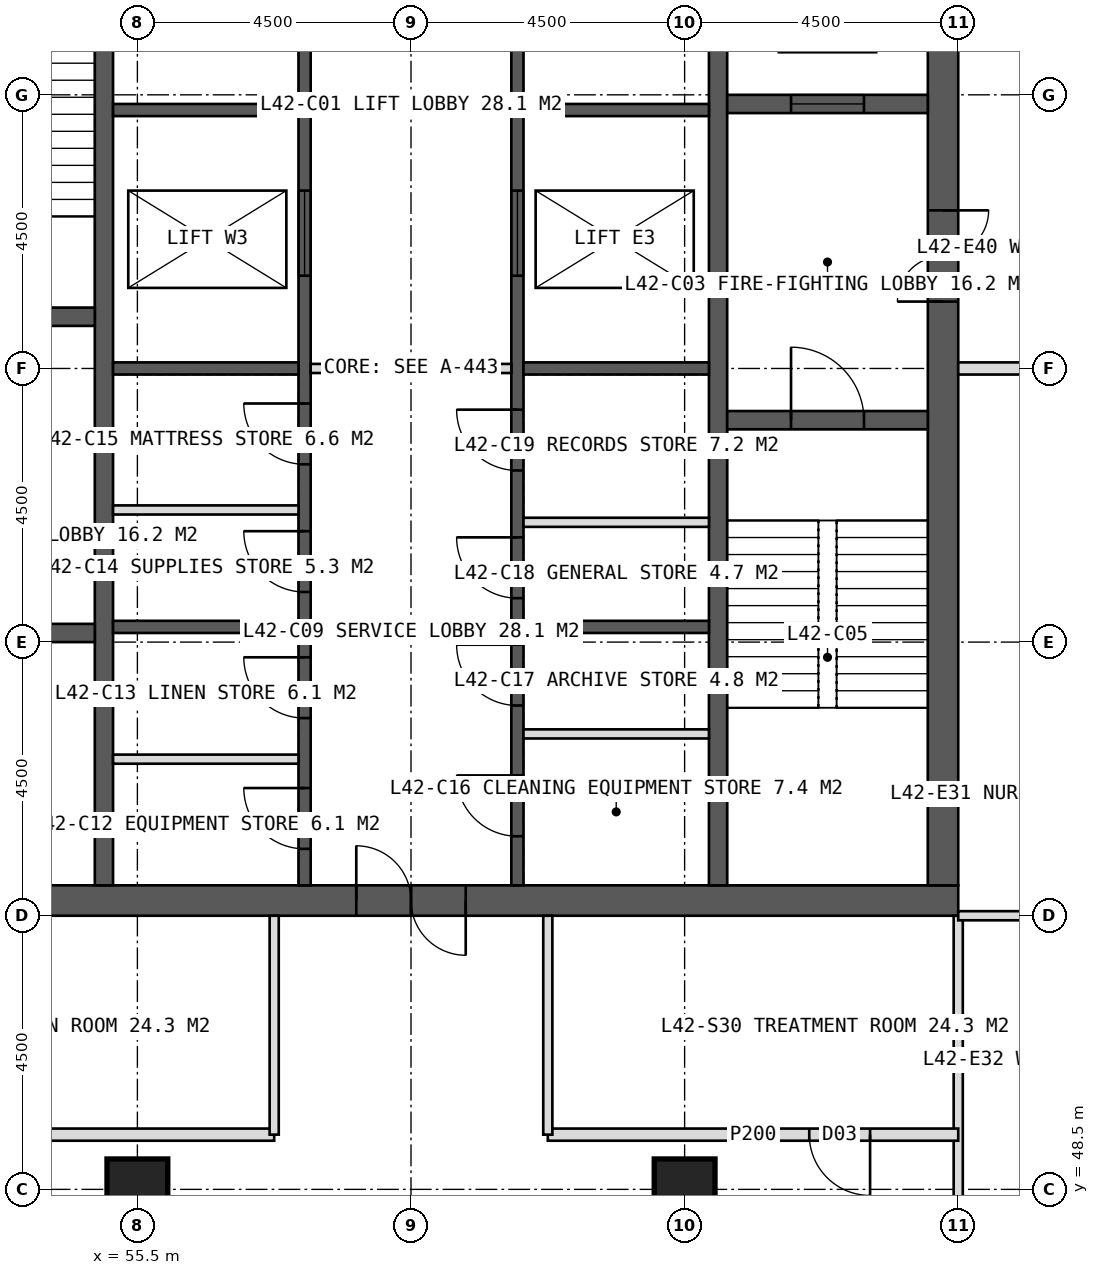
"""IFC4 building model, lengths in metres.
Left out: names, types, materials, properties, quantities, classifications, styles, units other than length and angle.
Written with IfcOpenShell. Run it as: python <this file> out.ifc"""

import sys

from ifc_helpers import new_model, si_unit, direction, frame, frame_2d, origin, origin_2d, place, context, subcontext, project, spatial, rectangle, hollow_rectangle, extrude, element, fill, save


model = new_model("IFC4")
c1 = context("Model", 3, precision=1e-05, world=origin(), true_north=direction((0.0, 1.0)))
c2 = subcontext(c1, "Body", "Model", "MODEL_VIEW")
j1 = project(units=[si_unit("LENGTHUNIT", "METRE"), si_unit("PLANEANGLEUNIT", "RADIAN")], contexts=[c1])
p1 = place(None, origin())
s1 = spatial("IfcSite", under=j1, at=p1, CompositionType="ELEMENT")
p2 = place(p1, origin())
s2 = spatial("IfcBuilding", under=s1, at=p2, CompositionType="ELEMENT")
p3 = place(p2, frame((0.0, 0.0, 177.0)))
s3 = spatial("IfcBuildingStorey", under=s2, at=p3, CompositionType="ELEMENT", Elevation=177.0)
p4 = place(p3, frame((51.0, 53.25, 0.0), z_axis=(0.0, 0.0, 1.0), x_axis=(1.0, 0.0, 0.0)))
e1 = element("IfcWall", 1, at=p4, inside=s3, PredefinedType="SHEAR", context=c2, shape_type="SweptSolid", body=[
    extrude(rectangle(XDim=18.0, YDim=0.5, at=frame_2d((9.0, 0.0))), origin(), (0.0, 0.0, 1.0), 4.0),
])
p5 = place(p4, frame((8.1, 0.0, 0.0)))
e2 = element("IfcOpeningElement", 2, at=p5, cuts=e1, PredefinedType="OPENING", context=c2, shape_type="SweptSolid", body=[
    extrude(rectangle(XDim=1.8, YDim=2.2, at=frame_2d((0.9, 1.1))), frame((0.0, 0.26, 0.0), z_axis=(0.0, -1.0, 0.0), x_axis=(1.0, 0.0, 0.0)), (0.0, 0.0, 1.0), 0.52),
])
p6 = place(p3, frame((68.75, 53.5, 0.0), z_axis=(0.0, 0.0, 1.0), x_axis=(0.0, 1.0, 0.0)))
e3 = element("IfcWall", 3, at=p6, inside=s3, PredefinedType="SHEAR", context=c2, shape_type="SweptSolid", body=[
    extrude(rectangle(XDim=17.0, YDim=0.5, at=frame_2d((8.5, 0.0))), origin(), (0.0, 0.0, 1.0), 4.0),
])
p7 = place(p6, frame((9.6, 0.0, 0.0)))
e4 = element("IfcOpeningElement", 4, at=p7, cuts=e3, PredefinedType="OPENING", context=c2, shape_type="SweptSolid", body=[
    extrude(rectangle(XDim=1.5, YDim=2.2, at=frame_2d((0.75, 1.1))), frame((0.0, 0.26, 0.0), z_axis=(0.0, -1.0, 0.0), x_axis=(1.0, 0.0, 0.0)), (0.0, 0.0, 1.0), 0.52),
])
for number, where, z_axis, x_axis in (
    (5, (54.95, 53.5, 0.0), (0.0, 0.0, 1.0), (0.0, 1.0, 0.0)),
    (6, (65.05, 53.5, 0.0), (0.0, 0.0, 1.0), (0.0, 1.0, 0.0)),
):
    element("IfcWall", number, at=place(p3, frame(where, z_axis=z_axis, x_axis=x_axis)), inside=s3, PredefinedType="SHEAR", context=c2, shape_type="SweptSolid", body=[
        extrude(rectangle(XDim=17.0, YDim=0.3, at=frame_2d((8.5, 0.0))), origin(), (0.0, 0.0, 1.0), 4.0),
    ])
p8 = place(p3, frame((58.25, 53.5, 0.0), z_axis=(0.0, 0.0, 1.0), x_axis=(0.0, 1.0, 0.0)))
e7 = element("IfcWall", 7, at=p8, inside=s3, PredefinedType="SHEAR", context=c2, shape_type="SweptSolid", body=[
    extrude(rectangle(XDim=17.0, YDim=0.2, at=frame_2d((8.5, 0.0))), origin(), (0.0, 0.0, 1.0), 4.0),
])
p9 = place(p8, frame((0.6, 0.0, 0.0)))
e8 = element("IfcOpeningElement", 8, at=p9, cuts=e7, PredefinedType="OPENING", context=c2, shape_type="SweptSolid", body=[
    extrude(rectangle(XDim=1.0, YDim=2.1, at=frame_2d((0.5, 1.05))), frame((0.0, 0.11, 0.0), z_axis=(0.0, -1.0, 0.0), x_axis=(1.0, 0.0, 0.0)), (0.0, 0.0, 1.0), 0.22),
])
p10 = place(p8, frame((2.75, 0.0, 0.0)))
e9 = element("IfcOpeningElement", 9, at=p10, cuts=e7, PredefinedType="OPENING", context=c2, shape_type="SweptSolid", body=[
    extrude(rectangle(XDim=1.0, YDim=2.1, at=frame_2d((0.5, 1.05))), frame((0.0, 0.11, 0.0), z_axis=(0.0, -1.0, 0.0), x_axis=(1.0, 0.0, 0.0)), (0.0, 0.0, 1.0), 0.22),
])
p11 = place(p8, frame((4.824, 0.0, 0.0)))
e10 = element("IfcOpeningElement", 10, at=p11, cuts=e7, PredefinedType="OPENING", context=c2, shape_type="SweptSolid", body=[
    extrude(rectangle(XDim=1.0, YDim=2.1, at=frame_2d((0.5, 1.05))), frame((0.0, 0.11, 0.0), z_axis=(0.0, -1.0, 0.0), x_axis=(1.0, 0.0, 0.0)), (0.0, 0.0, 1.0), 0.22),
])
p12 = place(p8, frame((6.924, 0.0, 0.0)))
e11 = element("IfcOpeningElement", 11, at=p12, cuts=e7, PredefinedType="OPENING", context=c2, shape_type="SweptSolid", body=[
    extrude(rectangle(XDim=1.0, YDim=2.1, at=frame_2d((0.5, 1.05))), frame((0.0, 0.11, 0.0), z_axis=(0.0, -1.0, 0.0), x_axis=(1.0, 0.0, 0.0)), (0.0, 0.0, 1.0), 0.22),
])
p13 = place(p8, frame((10.025, 0.0, 0.0)))
e12 = element("IfcOpeningElement", 12, at=p13, cuts=e7, PredefinedType="OPENING", context=c2, shape_type="SweptSolid", body=[
    extrude(rectangle(XDim=1.4, YDim=2.2, at=frame_2d((0.7, 1.1))), frame((0.0, 0.11, 0.0), z_axis=(0.0, -1.0, 0.0), x_axis=(1.0, 0.0, 0.0)), (0.0, 0.0, 1.0), 0.22),
])
p14 = place(p8, frame((14.325, 0.0, 0.0)))
e13 = element("IfcOpeningElement", 13, at=p14, cuts=e7, PredefinedType="OPENING", context=c2, shape_type="SweptSolid", body=[
    extrude(rectangle(XDim=1.4, YDim=2.2, at=frame_2d((0.7, 1.1))), frame((0.0, 0.11, 0.0), z_axis=(0.0, -1.0, 0.0), x_axis=(1.0, 0.0, 0.0)), (0.0, 0.0, 1.0), 0.22),
])
p15 = place(p3, frame((61.75, 53.5, 0.0), z_axis=(0.0, 0.0, 1.0), x_axis=(0.0, 1.0, 0.0)))
e14 = element("IfcWall", 14, at=p15, inside=s3, PredefinedType="SHEAR", context=c2, shape_type="SweptSolid", body=[
    extrude(rectangle(XDim=17.0, YDim=0.2, at=frame_2d((8.5, 0.0))), origin(), (0.0, 0.0, 1.0), 4.0),
])
p16 = place(p15, frame((0.808, 0.0, 0.0)))
e15 = element("IfcOpeningElement", 15, at=p16, cuts=e14, PredefinedType="OPENING", context=c2, shape_type="SweptSolid", body=[
    extrude(rectangle(XDim=1.0, YDim=2.1, at=frame_2d((0.5, 1.05))), frame((0.0, 0.11, 0.0), z_axis=(0.0, -1.0, 0.0), x_axis=(1.0, 0.0, 0.0)), (0.0, 0.0, 1.0), 0.22),
])
p17 = place(p15, frame((2.958, 0.0, 0.0)))
e16 = element("IfcOpeningElement", 16, at=p17, cuts=e14, PredefinedType="OPENING", context=c2, shape_type="SweptSolid", body=[
    extrude(rectangle(XDim=1.0, YDim=2.1, at=frame_2d((0.5, 1.05))), frame((0.0, 0.11, 0.0), z_axis=(0.0, -1.0, 0.0), x_axis=(1.0, 0.0, 0.0)), (0.0, 0.0, 1.0), 0.22),
])
p18 = place(p15, frame((4.722, 0.0, 0.0)))
e17 = element("IfcOpeningElement", 17, at=p18, cuts=e14, PredefinedType="OPENING", context=c2, shape_type="SweptSolid", body=[
    extrude(rectangle(XDim=1.0, YDim=2.1, at=frame_2d((0.5, 1.05))), frame((0.0, 0.11, 0.0), z_axis=(0.0, -1.0, 0.0), x_axis=(1.0, 0.0, 0.0)), (0.0, 0.0, 1.0), 0.22),
])
p19 = place(p15, frame((6.823, 0.0, 0.0)))
e18 = element("IfcOpeningElement", 18, at=p19, cuts=e14, PredefinedType="OPENING", context=c2, shape_type="SweptSolid", body=[
    extrude(rectangle(XDim=1.0, YDim=2.1, at=frame_2d((0.5, 1.05))), frame((0.0, 0.11, 0.0), z_axis=(0.0, -1.0, 0.0), x_axis=(1.0, 0.0, 0.0)), (0.0, 0.0, 1.0), 0.22),
])
p20 = place(p15, frame((10.025, 0.0, 0.0)))
e19 = element("IfcOpeningElement", 19, at=p20, cuts=e14, PredefinedType="OPENING", context=c2, shape_type="SweptSolid", body=[
    extrude(rectangle(XDim=1.4, YDim=2.2, at=frame_2d((0.7, 1.1))), frame((0.0, 0.11, 0.0), z_axis=(0.0, -1.0, 0.0), x_axis=(1.0, 0.0, 0.0)), (0.0, 0.0, 1.0), 0.22),
])
p21 = place(p15, frame((14.325, 0.0, 0.0)))
e20 = element("IfcOpeningElement", 20, at=p21, cuts=e14, PredefinedType="OPENING", context=c2, shape_type="SweptSolid", body=[
    extrude(rectangle(XDim=1.4, YDim=2.2, at=frame_2d((0.7, 1.1))), frame((0.0, 0.11, 0.0), z_axis=(0.0, -1.0, 0.0), x_axis=(1.0, 0.0, 0.0)), (0.0, 0.0, 1.0), 0.22),
])
for number, where, z_axis, x_axis in (
    (21, (55.1, 57.75, 0.0), (0.0, 0.0, 1.0), (1.0, 0.0, 0.0)),
    (22, (61.85, 57.75, 0.0), (0.0, 0.0, 1.0), (1.0, 0.0, 0.0)),
    (23, (55.1, 62.0, 0.0), (0.0, 0.0, 1.0), (1.0, 0.0, 0.0)),
    (24, (61.85, 62.0, 0.0), (0.0, 0.0, 1.0), (1.0, 0.0, 0.0)),
    (25, (55.1, 66.25, 0.0), (0.0, 0.0, 1.0), (1.0, 0.0, 0.0)),
    (26, (61.85, 66.25, 0.0), (0.0, 0.0, 1.0), (1.0, 0.0, 0.0)),
):
    element("IfcWall", number, at=place(p3, frame(where, z_axis=z_axis, x_axis=x_axis)), inside=s3, PredefinedType="SHEAR", context=c2, shape_type="SweptSolid", body=[
        extrude(rectangle(XDim=3.05, YDim=0.2, at=frame_2d((1.525, 0.0))), origin(), (0.0, 0.0, 1.0), 4.0),
    ])
p22 = place(p3, frame((51.5, 62.85, 0.0), z_axis=(0.0, 0.0, 1.0), x_axis=(1.0, 0.0, 0.0)))
e27 = element("IfcWall", 27, at=p22, inside=s3, PredefinedType="SHEAR", context=c2, shape_type="SweptSolid", body=[
    extrude(rectangle(XDim=3.3, YDim=0.3, at=frame_2d((1.65, 0.0))), origin(), (0.0, 0.0, 1.0), 4.0),
])
p23 = place(p22, frame((1.15, 0.0, 0.0)))
e28 = element("IfcOpeningElement", 28, at=p23, cuts=e27, PredefinedType="OPENING", context=c2, shape_type="SweptSolid", body=[
    extrude(rectangle(XDim=1.2, YDim=2.1, at=frame_2d((0.6, 1.05))), frame((0.0, 0.16, 0.0), z_axis=(0.0, -1.0, 0.0), x_axis=(1.0, 0.0, 0.0)), (0.0, 0.0, 1.0), 0.32),
])
p24 = place(p3, frame((51.5, 57.65, 0.0), z_axis=(0.0, 0.0, 1.0), x_axis=(1.0, 0.0, 0.0)))
e29 = element("IfcWall", 29, at=p24, inside=s3, PredefinedType="SHEAR", context=c2, shape_type="SweptSolid", body=[
    extrude(rectangle(XDim=3.3, YDim=0.3, at=frame_2d((1.65, 0.0))), origin(), (0.0, 0.0, 1.0), 4.0),
])
p25 = place(p24, frame((1.15, 0.0, 0.0)))
e30 = element("IfcOpeningElement", 30, at=p25, cuts=e29, PredefinedType="OPENING", context=c2, shape_type="SweptSolid", body=[
    extrude(rectangle(XDim=1.2, YDim=2.2, at=frame_2d((0.6, 1.1))), frame((0.0, 0.16, 0.0), z_axis=(0.0, -1.0, 0.0), x_axis=(1.0, 0.0, 0.0)), (0.0, 0.0, 1.0), 0.32),
])
p26 = place(p3, frame((65.2, 61.15, 0.0), z_axis=(0.0, 0.0, 1.0), x_axis=(1.0, 0.0, 0.0)))
e31 = element("IfcWall", 31, at=p26, inside=s3, PredefinedType="SHEAR", context=c2, shape_type="SweptSolid", body=[
    extrude(rectangle(XDim=3.3, YDim=0.3, at=frame_2d((1.65, 0.0))), origin(), (0.0, 0.0, 1.0), 4.0),
])
p27 = place(p26, frame((1.05, 0.0, 0.0)))
e32 = element("IfcOpeningElement", 32, at=p27, cuts=e31, PredefinedType="OPENING", context=c2, shape_type="SweptSolid", body=[
    extrude(rectangle(XDim=1.2, YDim=2.1, at=frame_2d((0.6, 1.05))), frame((0.0, 0.16, 0.0), z_axis=(0.0, -1.0, 0.0), x_axis=(1.0, 0.0, 0.0)), (0.0, 0.0, 1.0), 0.32),
])
p28 = place(p3, frame((65.2, 66.35, 0.0), z_axis=(0.0, 0.0, 1.0), x_axis=(1.0, 0.0, 0.0)))
e33 = element("IfcWall", 33, at=p28, inside=s3, PredefinedType="SHEAR", context=c2, shape_type="SweptSolid", body=[
    extrude(rectangle(XDim=3.3, YDim=0.3, at=frame_2d((1.65, 0.0))), origin(), (0.0, 0.0, 1.0), 4.0),
])
p29 = place(p28, frame((1.05, 0.0, 0.0)))
e34 = element("IfcOpeningElement", 34, at=p29, cuts=e33, PredefinedType="OPENING", context=c2, shape_type="SweptSolid", body=[
    extrude(rectangle(XDim=1.2, YDim=2.2, at=frame_2d((0.6, 1.1))), frame((0.0, 0.16, 0.0), z_axis=(0.0, -1.0, 0.0), x_axis=(1.0, 0.0, 0.0)), (0.0, 0.0, 1.0), 0.32),
])
for number, where, z_axis, x_axis in (
    (35, (55.5, 48.5, 0.0), (0.0, 0.0, 1.0), (1.0, 0.0, 0.0)),
    (36, (64.5, 48.5, 0.0), (0.0, 0.0, 1.0), (1.0, 0.0, 0.0)),
):
    element("IfcColumn", number, at=place(p3, frame(where, z_axis=z_axis, x_axis=x_axis)), inside=s3, PredefinedType="COLUMN", context=c2, shape_type="SweptSolid", body=[
        extrude(hollow_rectangle(XDim=1.0, YDim=1.0, WallThickness=0.1, at=origin_2d()), origin(), (0.0, 0.0, 1.0), 4.0),
    ])
p30 = place(p3, frame((69.0, 53.0, 0.0), z_axis=(0.0, 0.0, 1.0), x_axis=(0.0, -1.0, 0.0)))
e37 = element("IfcWall", 37, at=p30, inside=s3, PredefinedType="PARTITIONING", context=c2, shape_type="SweptSolid", body=[
    extrude(rectangle(XDim=5.1, YDim=0.15, at=frame_2d((2.55, 0.0))), origin(), (0.0, 0.0, 1.0), 3.75),
])
p31 = place(p3, frame((69.0, 49.4, 0.0), z_axis=(0.0, 0.0, 1.0), x_axis=(-1.0, 0.0, 0.0)))
e38 = element("IfcWall", 38, at=p31, inside=s3, PredefinedType="PARTITIONING", context=c2, shape_type="SweptSolid", body=[
    extrude(rectangle(XDim=6.75, YDim=0.2, at=frame_2d((3.375, 0.0))), origin(), (0.0, 0.0, 1.0), 3.75),
])
p32 = place(p31, frame((1.45, 0.0, 0.0)))
e39 = element("IfcOpeningElement", 39, at=p32, cuts=e38, PredefinedType="OPENING", context=c2, shape_type="SweptSolid", body=[
    extrude(rectangle(XDim=1.0, YDim=2.1, at=frame_2d((0.5, 1.05))), frame((0.0, 0.11, 0.0), z_axis=(0.0, -1.0, 0.0), x_axis=(1.0, 0.0, 0.0)), (0.0, 0.0, 1.0), 0.22),
])
p33 = place(p3, frame((57.75, 49.4, 0.0), z_axis=(0.0, 0.0, 1.0), x_axis=(-1.0, 0.0, 0.0)))
e40 = element("IfcWall", 40, at=p33, inside=s3, PredefinedType="PARTITIONING", context=c2, shape_type="SweptSolid", body=[
    extrude(rectangle(XDim=11.85, YDim=0.2, at=frame_2d((5.925, 0.0))), origin(), (0.0, 0.0, 1.0), 3.75),
])
p34 = place(p33, frame((4.3, 0.0, 0.0)))
e41 = element("IfcOpeningElement", 41, at=p34, cuts=e40, PredefinedType="OPENING", context=c2, shape_type="SweptSolid", body=[
    extrude(rectangle(XDim=1.0, YDim=2.1, at=frame_2d((0.5, 1.05))), frame((0.0, 0.11, 0.0), z_axis=(0.0, -1.0, 0.0), x_axis=(1.0, 0.0, 0.0)), (0.0, 0.0, 1.0), 0.22),
])
p35 = place(p33, frame((8.8, 0.0, 0.0)))
e42 = element("IfcOpeningElement", 42, at=p35, cuts=e40, PredefinedType="OPENING", context=c2, shape_type="SweptSolid", body=[
    extrude(rectangle(XDim=1.0, YDim=2.1, at=frame_2d((0.5, 1.05))), frame((0.0, 0.11, 0.0), z_axis=(0.0, -1.0, 0.0), x_axis=(1.0, 0.0, 0.0)), (0.0, 0.0, 1.0), 0.22),
])
for number, where, z_axis, x_axis in (
    (43, (62.25, 53.0, 0.0), (0.0, 0.0, 1.0), (0.0, -1.0, 0.0)),
    (44, (57.75, 53.0, 0.0), (0.0, 0.0, 1.0), (0.0, -1.0, 0.0)),
):
    element("IfcWall", number, at=place(p3, frame(where, z_axis=z_axis, x_axis=x_axis)), inside=s3, PredefinedType="PARTITIONING", context=c2, shape_type="SweptSolid", body=[
        extrude(rectangle(XDim=3.6, YDim=0.15, at=frame_2d((1.8, 0.0))), origin(), (0.0, 0.0, 1.0), 3.75),
    ])
p36 = place(p3, frame((69.0, 62.0, 0.0), z_axis=(0.0, 0.0, 1.0), x_axis=(1.0, 0.0, 0.0)))
e45 = element("IfcWall", 45, at=p36, inside=s3, PredefinedType="SOLIDWALL", context=c2, shape_type="SweptSolid", body=[
    extrude(rectangle(XDim=5.1, YDim=0.2, at=frame_2d((2.55, 0.0))), origin(), (0.0, 0.0, 1.0), 2.95),
])
p37 = place(p3, frame((69.0, 53.0, 0.0), z_axis=(0.0, 0.0, 1.0), x_axis=(1.0, 0.0, 0.0)))
e46 = element("IfcWall", 46, at=p37, inside=s3, PredefinedType="PARTITIONING", context=c2, shape_type="SweptSolid", body=[
    extrude(rectangle(XDim=5.1, YDim=0.15, at=frame_2d((2.55, 0.0))), origin(), (0.0, 0.0, 1.0), 3.75),
])
for number, where, z_axis, x_axis in (
    (47, (55.1, 55.575, 0.0), (0.0, 0.0, 1.0), (1.0, 0.0, 0.0)),
    (48, (61.85, 55.99, 0.0), (0.0, 0.0, 1.0), (1.0, 0.0, 0.0)),
    (49, (55.1, 59.673, 0.0), (0.0, 0.0, 1.0), (1.0, 0.0, 0.0)),
    (50, (61.85, 59.47, 0.0), (0.0, 0.0, 1.0), (1.0, 0.0, 0.0)),
):
    element("IfcWall", number, at=place(p3, frame(where, z_axis=z_axis, x_axis=x_axis)), inside=s3, PredefinedType="PARTITIONING", context=c2, shape_type="SweptSolid", body=[
        extrude(rectangle(XDim=3.05, YDim=0.15, at=frame_2d((1.525, 0.0))), origin(), (0.0, 0.0, 1.0), 3.75),
    ])
p38 = place(p3, frame((58.35, 62.0, 0.0), z_axis=(0.0, 0.0, 1.0), x_axis=(1.0, 0.0, 0.0)))
e51 = element("IfcWall", 51, at=p38, inside=s3, PredefinedType="PARTITIONING", context=c2, shape_type="SweptSolid", body=[
    extrude(rectangle(XDim=3.3, YDim=0.15, at=frame_2d((1.65, 0.0))), origin(), (0.0, 0.0, 1.0), 3.75),
])
p39 = place(p32, origin())
e52 = element("IfcDoor", 52, at=p39, inside=s3, OperationType="SINGLE_SWING_LEFT", PredefinedType="DOOR", context=c2, shape_type="SweptSolid", body=[
    extrude(rectangle(XDim=1.0, YDim=2.1, at=frame_2d((0.5, 1.05))), frame((0.0, 0.025, 0.0), z_axis=(0.0, -1.0, 0.0), x_axis=(1.0, 0.0, 0.0)), (0.0, 0.0, 1.0), 0.05),
])
fill(e39, e52)
p40 = place(p7, origin())
e53 = element("IfcDoor", 53, at=p40, inside=s3, OperationType="DOUBLE_DOOR_SINGLE_SWING", PredefinedType="DOOR", context=c2, shape_type="SweptSolid", body=[
    extrude(rectangle(XDim=1.5, YDim=2.2, at=frame_2d((0.75, 1.1))), frame((0.0, 0.025, 0.0), z_axis=(0.0, -1.0, 0.0), x_axis=(1.0, 0.0, 0.0)), (0.0, 0.0, 1.0), 0.05),
])
fill(e4, e53)
p41 = place(p27, origin())
e54 = element("IfcDoor", 54, at=p41, inside=s3, OperationType="SINGLE_SWING_LEFT", PredefinedType="DOOR", context=c2, shape_type="SweptSolid", body=[
    extrude(rectangle(XDim=1.2, YDim=2.1, at=frame_2d((0.6, 1.05))), frame((0.0, 0.025, 0.0), z_axis=(0.0, -1.0, 0.0), x_axis=(1.0, 0.0, 0.0)), (0.0, 0.0, 1.0), 0.05),
])
fill(e32, e54)
p42 = place(p29, origin())
e55 = element("IfcDoor", 55, at=p42, inside=s3, OperationType="SLIDING_TO_LEFT", PredefinedType="DOOR", context=c2, shape_type="SweptSolid", body=[
    extrude(rectangle(XDim=1.2, YDim=2.2, at=frame_2d((0.6, 1.1))), frame((0.0, 0.025, 0.0), z_axis=(0.0, -1.0, 0.0), x_axis=(1.0, 0.0, 0.0)), (0.0, 0.0, 1.0), 0.05),
])
fill(e34, e55)
p43 = place(p9, origin())
e56 = element("IfcDoor", 56, at=p43, inside=s3, OperationType="SINGLE_SWING_RIGHT", PredefinedType="DOOR", context=c2, shape_type="SweptSolid", body=[
    extrude(rectangle(XDim=1.0, YDim=2.1, at=frame_2d((0.5, 1.05))), frame((0.0, 0.025, 0.0), z_axis=(0.0, -1.0, 0.0), x_axis=(1.0, 0.0, 0.0)), (0.0, 0.0, 1.0), 0.05),
])
fill(e8, e56)
p44 = place(p10, origin())
e57 = element("IfcDoor", 57, at=p44, inside=s3, OperationType="SINGLE_SWING_RIGHT", PredefinedType="DOOR", context=c2, shape_type="SweptSolid", body=[
    extrude(rectangle(XDim=1.0, YDim=2.1, at=frame_2d((0.5, 1.05))), frame((0.0, 0.025, 0.0), z_axis=(0.0, -1.0, 0.0), x_axis=(1.0, 0.0, 0.0)), (0.0, 0.0, 1.0), 0.05),
])
fill(e9, e57)
p45 = place(p16, origin())
e58 = element("IfcDoor", 58, at=p45, inside=s3, OperationType="SINGLE_SWING_RIGHT", PredefinedType="DOOR", context=c2, shape_type="SweptSolid", body=[
    extrude(rectangle(XDim=1.0, YDim=2.1, at=frame_2d((0.5, 1.05))), frame((0.0, 0.025, 0.0), z_axis=(0.0, -1.0, 0.0), x_axis=(1.0, 0.0, 0.0)), (0.0, 0.0, 1.0), 0.05),
])
fill(e15, e58)
p46 = place(p17, origin())
e59 = element("IfcDoor", 59, at=p46, inside=s3, OperationType="SINGLE_SWING_RIGHT", PredefinedType="DOOR", context=c2, shape_type="SweptSolid", body=[
    extrude(rectangle(XDim=1.0, YDim=2.1, at=frame_2d((0.5, 1.05))), frame((0.0, 0.025, 0.0), z_axis=(0.0, -1.0, 0.0), x_axis=(1.0, 0.0, 0.0)), (0.0, 0.0, 1.0), 0.05),
])
fill(e16, e59)
p47 = place(p11, origin())
e60 = element("IfcDoor", 60, at=p47, inside=s3, OperationType="SINGLE_SWING_RIGHT", PredefinedType="DOOR", context=c2, shape_type="SweptSolid", body=[
    extrude(rectangle(XDim=1.0, YDim=2.1, at=frame_2d((0.5, 1.05))), frame((0.0, 0.025, 0.0), z_axis=(0.0, -1.0, 0.0), x_axis=(1.0, 0.0, 0.0)), (0.0, 0.0, 1.0), 0.05),
])
fill(e10, e60)
p48 = place(p12, origin())
e61 = element("IfcDoor", 61, at=p48, inside=s3, OperationType="SINGLE_SWING_RIGHT", PredefinedType="DOOR", context=c2, shape_type="SweptSolid", body=[
    extrude(rectangle(XDim=1.0, YDim=2.1, at=frame_2d((0.5, 1.05))), frame((0.0, 0.025, 0.0), z_axis=(0.0, -1.0, 0.0), x_axis=(1.0, 0.0, 0.0)), (0.0, 0.0, 1.0), 0.05),
])
fill(e11, e61)
p49 = place(p18, origin())
e62 = element("IfcDoor", 62, at=p49, inside=s3, OperationType="SINGLE_SWING_RIGHT", PredefinedType="DOOR", context=c2, shape_type="SweptSolid", body=[
    extrude(rectangle(XDim=1.0, YDim=2.1, at=frame_2d((0.5, 1.05))), frame((0.0, 0.025, 0.0), z_axis=(0.0, -1.0, 0.0), x_axis=(1.0, 0.0, 0.0)), (0.0, 0.0, 1.0), 0.05),
])
fill(e17, e62)
p50 = place(p19, origin())
e63 = element("IfcDoor", 63, at=p50, inside=s3, OperationType="SINGLE_SWING_RIGHT", PredefinedType="DOOR", context=c2, shape_type="SweptSolid", body=[
    extrude(rectangle(XDim=1.0, YDim=2.1, at=frame_2d((0.5, 1.05))), frame((0.0, 0.025, 0.0), z_axis=(0.0, -1.0, 0.0), x_axis=(1.0, 0.0, 0.0)), (0.0, 0.0, 1.0), 0.05),
])
fill(e18, e63)
p51 = place(p13, origin())
e64 = element("IfcDoor", 64, at=p51, inside=s3, OperationType="SLIDING_TO_LEFT", PredefinedType="DOOR", context=c2, shape_type="SweptSolid", body=[
    extrude(rectangle(XDim=1.4, YDim=2.2, at=frame_2d((0.7, 1.1))), frame((0.0, 0.025, 0.0), z_axis=(0.0, -1.0, 0.0), x_axis=(1.0, 0.0, 0.0)), (0.0, 0.0, 1.0), 0.05),
])
fill(e12, e64)
p52 = place(p20, origin())
e65 = element("IfcDoor", 65, at=p52, inside=s3, OperationType="SLIDING_TO_LEFT", PredefinedType="DOOR", context=c2, shape_type="SweptSolid", body=[
    extrude(rectangle(XDim=1.4, YDim=2.2, at=frame_2d((0.7, 1.1))), frame((0.0, 0.025, 0.0), z_axis=(0.0, -1.0, 0.0), x_axis=(1.0, 0.0, 0.0)), (0.0, 0.0, 1.0), 0.05),
])
fill(e19, e65)
p53 = place(p5, origin())
e66 = element("IfcDoor", 66, at=p53, inside=s3, OperationType="DOUBLE_DOOR_SINGLE_SWING", PredefinedType="DOOR", context=c2, shape_type="SweptSolid", body=[
    extrude(rectangle(XDim=1.8, YDim=2.2, at=frame_2d((0.9, 1.1))), frame((0.0, 0.025, 0.0), z_axis=(0.0, -1.0, 0.0), x_axis=(1.0, 0.0, 0.0)), (0.0, 0.0, 1.0), 0.05),
])
fill(e2, e66)
save(model, sys.argv[1])
